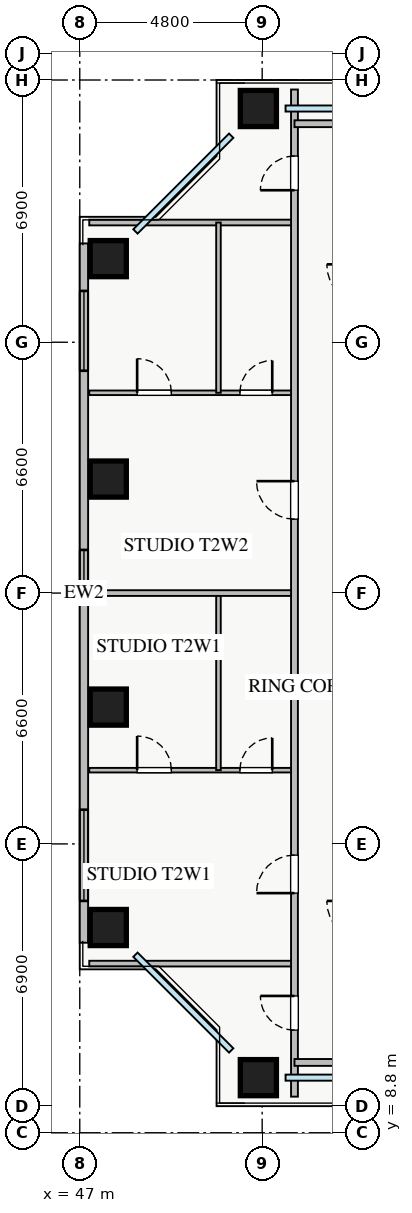
"""IFC4 building model, lengths in metres.
Left out: names, types, materials, properties, quantities, classifications, styles, units other than length and angle.
Written with IfcOpenShell. Run it as: python <this file> out.ifc"""

import sys

from ifc_helpers import new_model, si_unit, direction, frame, frame_2d, origin, origin_2d, place, context, subcontext, project, spatial, rectangle, extrude, source, transform, mapped, element, fill, save


model = new_model("IFC4")
c1 = context("Model", 3, precision=1e-05, world=origin(), true_north=direction((0.0, 1.0)))
c2 = subcontext(c1, "Body", "Model", "MODEL_VIEW")
j1 = project(units=[si_unit("LENGTHUNIT", "METRE"), si_unit("PLANEANGLEUNIT", "RADIAN")], contexts=[c1])
p1 = place(None, origin())
s1 = spatial("IfcSite", under=j1, at=p1, CompositionType="ELEMENT")
p2 = place(p1, origin())
s2 = spatial("IfcBuilding", under=s1, at=p2, CompositionType="ELEMENT")
p3 = place(p2, frame((0.0, 0.0, 60.0)))
s3 = spatial("IfcBuildingStorey", under=s2, at=p3, CompositionType="ELEMENT", Elevation=60.0)
m1 = source(origin(), c2, "Body", "SweptSolid", [
    extrude(rectangle(XDim=0.95, YDim=0.95, at=origin_2d()), origin(), (0.0, 0.0, 1.0), 3.25),
])
for number, where, z_axis, x_axis in (
    (1, (51.7, 10.25, 0.0), (0.0, 0.0, 1.0), (1.0, 0.0, 0.0)),
    (2, (51.7, 35.75, 0.0), (0.0, 0.0, 1.0), (1.0, 0.0, 0.0)),
    (3, (47.75, 14.2, 0.0), (0.0, 0.0, 1.0), (1.0, 0.0, 0.0)),
    (4, (47.75, 20.0, 0.0), (0.0, 0.0, 1.0), (1.0, 0.0, 0.0)),
    (5, (47.75, 26.0, 0.0), (0.0, 0.0, 1.0), (1.0, 0.0, 0.0)),
    (6, (47.75, 31.8, 0.0), (0.0, 0.0, 1.0), (1.0, 0.0, 0.0)),
):
    element("IfcColumn", number, at=place(p3, frame(where, z_axis=z_axis, x_axis=x_axis)), inside=s3, PredefinedType="COLUMN", context=c2, shape_type="MappedRepresentation", body=[
        mapped(m1, transform((0.0, 0.0, 0.0), x_axis=(1.0, 0.0, 0.0), y_axis=(0.0, 1.0, 0.0), z_axis=(0.0, 0.0, 1.0), scale=1.0)),
    ])
p4 = place(p3, frame((47.11, 13.8, 0.0), z_axis=(0.0, 0.0, 1.0), x_axis=(0.0, 1.0, 0.0)))
e7 = element("IfcWall", 7, at=p4, inside=s3, PredefinedType="STANDARD", context=c2, shape_type="SweptSolid", body=[
    extrude(rectangle(XDim=18.4, YDim=0.22, at=frame_2d((9.2, 0.0))), origin(), (0.0, 0.0, 1.0), 2.61),
])
p5 = place(p4, frame((1.1, 0.0, 0.9)))
e8 = element("IfcOpeningElement", 8, at=p5, cuts=e7, PredefinedType="OPENING", context=c2, shape_type="SweptSolid", body=[
    extrude(rectangle(XDim=2.4, YDim=1.48, at=frame_2d((1.2, 0.74))), frame((0.0, 0.12, 0.0), z_axis=(0.0, -1.0, 0.0), x_axis=(1.0, 0.0, 0.0)), (0.0, 0.0, 1.0), 0.24),
])
p6 = place(p4, frame((15.05, 0.0, 0.9)))
e9 = element("IfcOpeningElement", 9, at=p6, cuts=e7, PredefinedType="OPENING", context=c2, shape_type="SweptSolid", body=[
    extrude(rectangle(XDim=2.1, YDim=1.48, at=frame_2d((1.05, 0.74))), frame((0.0, 0.12, 0.0), z_axis=(0.0, -1.0, 0.0), x_axis=(1.0, 0.0, 0.0)), (0.0, 0.0, 1.0), 0.24),
])
p7 = place(p4, frame((9.435, 0.0, 0.9)))
e10 = element("IfcOpeningElement", 10, at=p7, cuts=e7, PredefinedType="OPENING", context=c2, shape_type="SweptSolid", body=[
    extrude(rectangle(XDim=0.9, YDim=1.2, at=frame_2d((0.45, 0.6))), frame((0.0, 0.12, 0.0), z_axis=(0.0, -1.0, 0.0), x_axis=(1.0, 0.0, 0.0)), (0.0, 0.0, 1.0), 0.24),
])
for number, where, z_axis, x_axis in (
    (11, (47.25, 32.75, 0.0), (0.0, 0.0, 1.0), (1.0, 0.0, 0.0)),
    (12, (47.25, 13.25, 0.0), (0.0, 0.0, 1.0), (1.0, 0.0, 0.0)),
):
    element("IfcWall", number, at=place(p3, frame(where, z_axis=z_axis, x_axis=x_axis)), inside=s3, PredefinedType="PARTITIONING", context=c2, shape_type="SweptSolid", body=[
        extrude(rectangle(XDim=5.4, YDim=0.15, at=frame_2d((2.7, 0.0))), origin(), (0.0, 0.0, 1.0), 3.07),
    ])
p8 = place(p3, frame((47.25, 18.34, 0.0), z_axis=(0.0, 0.0, 1.0), x_axis=(1.0, 0.0, 0.0)))
e13 = element("IfcWall", 13, at=p8, inside=s3, PredefinedType="PLUMBINGWALL", context=c2, shape_type="SweptSolid", body=[
    extrude(rectangle(XDim=5.4, YDim=0.12, at=frame_2d((2.7, 0.0))), origin(), (0.0, 0.0, 1.0), 2.765),
])
p9 = place(p8, frame((1.26, 0.0, 0.0)))
e14 = element("IfcOpeningElement", 14, at=p9, cuts=e13, PredefinedType="OPENING", context=c2, shape_type="SweptSolid", body=[
    extrude(rectangle(XDim=0.9, YDim=2.05, at=frame_2d((0.45, 1.025))), frame((0.0, 0.07, 0.0), z_axis=(0.0, -1.0, 0.0), x_axis=(1.0, 0.0, 0.0)), (0.0, 0.0, 1.0), 0.14),
])
p10 = place(p8, frame((3.965, 0.0, 0.0)))
e15 = element("IfcOpeningElement", 15, at=p10, cuts=e13, PredefinedType="OPENING", context=c2, shape_type="SweptSolid", body=[
    extrude(rectangle(XDim=0.85, YDim=2.05, at=frame_2d((0.425, 1.025))), frame((0.0, 0.07, 0.0), z_axis=(0.0, -1.0, 0.0), x_axis=(1.0, 0.0, 0.0)), (0.0, 0.0, 1.0), 0.14),
])
p11 = place(p3, frame((50.65, 18.34, 0.0), z_axis=(0.0, 0.0, 1.0), x_axis=(0.0, 1.0, 0.0)))
e16 = element("IfcWall", 16, at=p11, inside=s3, PredefinedType="PLUMBINGWALL", context=c2, shape_type="SweptSolid", body=[
    extrude(rectangle(XDim=4.66, YDim=0.12, at=frame_2d((2.33, 0.0))), origin(), (0.0, 0.0, 1.0), 3.07),
])
p12 = place(p3, frame((47.25, 28.27, 0.0), z_axis=(0.0, 0.0, 1.0), x_axis=(1.0, 0.0, 0.0)))
e17 = element("IfcWall", 17, at=p12, inside=s3, PredefinedType="PLUMBINGWALL", context=c2, shape_type="SweptSolid", body=[
    extrude(rectangle(XDim=5.4, YDim=0.12, at=frame_2d((2.7, 0.0))), origin(), (0.0, 0.0, 1.0), 3.07),
])
p13 = place(p12, frame((1.26, 0.0, 0.0)))
e18 = element("IfcOpeningElement", 18, at=p13, cuts=e17, PredefinedType="OPENING", context=c2, shape_type="SweptSolid", body=[
    extrude(rectangle(XDim=0.9, YDim=2.05, at=frame_2d((0.45, 1.025))), frame((0.0, 0.07, 0.0), z_axis=(0.0, -1.0, 0.0), x_axis=(1.0, 0.0, 0.0)), (0.0, 0.0, 1.0), 0.14),
])
p14 = place(p12, frame((3.965, 0.0, 0.0)))
e19 = element("IfcOpeningElement", 19, at=p14, cuts=e17, PredefinedType="OPENING", context=c2, shape_type="SweptSolid", body=[
    extrude(rectangle(XDim=0.85, YDim=2.05, at=frame_2d((0.425, 1.025))), frame((0.0, 0.07, 0.0), z_axis=(0.0, -1.0, 0.0), x_axis=(1.0, 0.0, 0.0)), (0.0, 0.0, 1.0), 0.14),
])
p15 = place(p3, frame((50.65, 28.27, 0.0), z_axis=(0.0, 0.0, 1.0), x_axis=(0.0, 1.0, 0.0)))
e20 = element("IfcWall", 20, at=p15, inside=s3, PredefinedType="PLUMBINGWALL", context=c2, shape_type="SweptSolid", body=[
    extrude(rectangle(XDim=4.48, YDim=0.12, at=frame_2d((2.24, 0.0))), origin(), (0.0, 0.0, 1.0), 3.07),
])
p16 = place(p3, frame((47.25, 23.0, 0.0), z_axis=(0.0, 0.0, 1.0), x_axis=(1.0, 0.0, 0.0)))
e21 = element("IfcWall", 21, at=p16, inside=s3, PredefinedType="PARTITIONING", context=c2, shape_type="SweptSolid", body=[
    extrude(rectangle(XDim=5.4, YDim=0.15, at=frame_2d((2.7, 0.0))), origin(), (0.0, 0.0, 1.0), 2.765),
])
p17 = place(p3, frame((52.65, 9.75, 0.0), z_axis=(0.0, 0.0, 1.0), x_axis=(0.0, 1.0, 0.0)))
e22 = element("IfcWall", 22, at=p17, inside=s3, PredefinedType="PARTITIONING", context=c2, shape_type="SweptSolid", body=[
    extrude(rectangle(XDim=26.5, YDim=0.18, at=frame_2d((13.25, 0.0))), origin(), (0.0, 0.0, 1.0), 3.07),
])
p18 = place(p17, frame((23.85, 0.0, 0.0)))
e23 = element("IfcOpeningElement", 23, at=p18, cuts=e22, PredefinedType="OPENING", context=c2, shape_type="SweptSolid", body=[
    extrude(rectangle(XDim=0.9, YDim=2.05, at=frame_2d((0.45, 1.025))), frame((0.0, 0.1, 0.0), z_axis=(0.0, -1.0, 0.0), x_axis=(1.0, 0.0, 0.0)), (0.0, 0.0, 1.0), 0.2),
])
p19 = place(p17, frame((1.75, 0.0, 0.0)))
e24 = element("IfcOpeningElement", 24, at=p19, cuts=e22, PredefinedType="OPENING", context=c2, shape_type="SweptSolid", body=[
    extrude(rectangle(XDim=0.9, YDim=2.05, at=frame_2d((0.45, 1.025))), frame((0.0, 0.1, 0.0), z_axis=(0.0, -1.0, 0.0), x_axis=(1.0, 0.0, 0.0)), (0.0, 0.0, 1.0), 0.2),
])
p20 = place(p17, frame((5.355, 0.0, 0.0)))
e25 = element("IfcOpeningElement", 25, at=p20, cuts=e22, PredefinedType="OPENING", context=c2, shape_type="SweptSolid", body=[
    extrude(rectangle(XDim=1.0, YDim=2.05, at=frame_2d((0.5, 1.025))), frame((0.0, 0.1, 0.0), z_axis=(0.0, -1.0, 0.0), x_axis=(1.0, 0.0, 0.0)), (0.0, 0.0, 1.0), 0.2),
])
p21 = place(p17, frame((15.195, 0.0, 0.0)))
e26 = element("IfcOpeningElement", 26, at=p21, cuts=e22, PredefinedType="OPENING", context=c2, shape_type="SweptSolid", body=[
    extrude(rectangle(XDim=1.0, YDim=2.05, at=frame_2d((0.5, 1.025))), frame((0.0, 0.1, 0.0), z_axis=(0.0, -1.0, 0.0), x_axis=(1.0, 0.0, 0.0)), (0.0, 0.0, 1.0), 0.2),
])
p22 = place(p3, frame((52.65, 35.35, 0.0), z_axis=(0.0, 0.0, 1.0), x_axis=(1.0, 0.0, 0.0)))
e27 = element("IfcWall", 27, at=p22, inside=s3, PredefinedType="PARTITIONING", context=c2, shape_type="SweptSolid", body=[
    extrude(rectangle(XDim=17.0, YDim=0.18, at=frame_2d((8.5, 0.0))), origin(), (0.0, 0.0, 1.0), 3.07),
])
p23 = place(p22, frame((3.825, 0.0, 0.0)))
e28 = element("IfcOpeningElement", 28, at=p23, cuts=e27, PredefinedType="OPENING", context=c2, shape_type="SweptSolid", body=[
    extrude(rectangle(XDim=0.9, YDim=2.05, at=frame_2d((0.45, 1.025))), frame((0.0, 0.1, 0.0), z_axis=(0.0, -1.0, 0.0), x_axis=(1.0, 0.0, 0.0)), (0.0, 0.0, 1.0), 0.2),
])
p24 = place(p22, frame((12.325, 0.0, 0.0)))
e29 = element("IfcOpeningElement", 29, at=p24, cuts=e27, PredefinedType="OPENING", context=c2, shape_type="SweptSolid", body=[
    extrude(rectangle(XDim=0.9, YDim=2.05, at=frame_2d((0.45, 1.025))), frame((0.0, 0.1, 0.0), z_axis=(0.0, -1.0, 0.0), x_axis=(1.0, 0.0, 0.0)), (0.0, 0.0, 1.0), 0.2),
])
p25 = place(p3, frame((52.65, 10.65, 0.0), z_axis=(0.0, 0.0, 1.0), x_axis=(1.0, 0.0, 0.0)))
e30 = element("IfcWall", 30, at=p25, inside=s3, PredefinedType="PARTITIONING", context=c2, shape_type="SweptSolid", body=[
    extrude(rectangle(XDim=17.0, YDim=0.18, at=frame_2d((8.5, 0.0))), origin(), (0.0, 0.0, 1.0), 3.07),
])
p26 = place(p25, frame((4.375, 0.0, 0.0)))
e31 = element("IfcOpeningElement", 31, at=p26, cuts=e30, PredefinedType="OPENING", context=c2, shape_type="SweptSolid", body=[
    extrude(rectangle(XDim=0.9, YDim=2.05, at=frame_2d((0.45, 1.025))), frame((0.0, 0.1, 0.0), z_axis=(0.0, -1.0, 0.0), x_axis=(1.0, 0.0, 0.0)), (0.0, 0.0, 1.0), 0.2),
])
p27 = place(p25, frame((12.875, 0.0, 0.0)))
e32 = element("IfcOpeningElement", 32, at=p27, cuts=e30, PredefinedType="OPENING", context=c2, shape_type="SweptSolid", body=[
    extrude(rectangle(XDim=0.9, YDim=2.05, at=frame_2d((0.45, 1.025))), frame((0.0, 0.1, 0.0), z_axis=(0.0, -1.0, 0.0), x_axis=(1.0, 0.0, 0.0)), (0.0, 0.0, 1.0), 0.2),
])
m2 = source(origin(), c2, "Body", "SweptSolid", [
    extrude(rectangle(XDim=2.4, YDim=1.48, at=frame_2d((1.2, 0.74))), frame((0.0, 0.03, 0.0), z_axis=(0.0, -1.0, 0.0), x_axis=(1.0, 0.0, 0.0)), (0.0, 0.0, 1.0), 0.06),
])
p28 = place(p5, origin())
e33 = element("IfcWindow", 33, at=p28, inside=s3, PartitioningType="TRIPLE_PANEL_VERTICAL", PredefinedType="WINDOW", context=c2, shape_type="MappedRepresentation", body=[
    mapped(m2, transform((0.0, 0.0, 0.0), x_axis=(1.0, 0.0, 0.0), y_axis=(0.0, 1.0, 0.0), z_axis=(0.0, 0.0, 1.0), scale=1.0)),
])
fill(e8, e33)
m3 = source(origin(), c2, "Body", "SweptSolid", [
    extrude(rectangle(XDim=2.1, YDim=1.48, at=frame_2d((1.05, 0.74))), frame((0.0, 0.03, 0.0), z_axis=(0.0, -1.0, 0.0), x_axis=(1.0, 0.0, 0.0)), (0.0, 0.0, 1.0), 0.06),
])
p29 = place(p6, origin())
e34 = element("IfcWindow", 34, at=p29, inside=s3, PartitioningType="TRIPLE_PANEL_VERTICAL", PredefinedType="WINDOW", context=c2, shape_type="MappedRepresentation", body=[
    mapped(m3, transform((0.0, 0.0, 0.0), x_axis=(1.0, 0.0, 0.0), y_axis=(0.0, 1.0, 0.0), z_axis=(0.0, 0.0, 1.0), scale=1.0)),
])
fill(e9, e34)
m4 = source(origin(), c2, "Body", "SweptSolid", [
    extrude(rectangle(XDim=0.9, YDim=2.05, at=frame_2d((0.45, 1.025))), frame((0.0, 0.025, 0.0), z_axis=(0.0, -1.0, 0.0), x_axis=(1.0, 0.0, 0.0)), (0.0, 0.0, 1.0), 0.05),
])
p30 = place(p9, origin())
e35 = element("IfcDoor", 35, at=p30, inside=s3, OperationType="SINGLE_SWING_LEFT", PredefinedType="DOOR", context=c2, shape_type="MappedRepresentation", body=[
    mapped(m4, transform((0.0, 0.0, 0.0), x_axis=(1.0, 0.0, 0.0), y_axis=(0.0, 1.0, 0.0), z_axis=(0.0, 0.0, 1.0), scale=1.0)),
])
fill(e14, e35)
m5 = source(origin(), c2, "Body", "SweptSolid", [
    extrude(rectangle(XDim=0.85, YDim=2.05, at=frame_2d((0.425, 1.025))), frame((0.0, 0.025, 0.0), z_axis=(0.0, -1.0, 0.0), x_axis=(1.0, 0.0, 0.0)), (0.0, 0.0, 1.0), 0.05),
])
p31 = place(p10, origin())
e36 = element("IfcDoor", 36, at=p31, inside=s3, OperationType="SINGLE_SWING_RIGHT", PredefinedType="DOOR", context=c2, shape_type="MappedRepresentation", body=[
    mapped(m5, transform((0.0, 0.0, 0.0), x_axis=(1.0, 0.0, 0.0), y_axis=(0.0, 1.0, 0.0), z_axis=(0.0, 0.0, 1.0), scale=1.0)),
])
fill(e15, e36)
p32 = place(p13, origin())
e37 = element("IfcDoor", 37, at=p32, inside=s3, OperationType="SINGLE_SWING_LEFT", PredefinedType="DOOR", context=c2, shape_type="MappedRepresentation", body=[
    mapped(m4, transform((0.0, 0.0, 0.0), x_axis=(1.0, 0.0, 0.0), y_axis=(0.0, 1.0, 0.0), z_axis=(0.0, 0.0, 1.0), scale=1.0)),
])
fill(e18, e37)
p33 = place(p14, origin())
e38 = element("IfcDoor", 38, at=p33, inside=s3, OperationType="SINGLE_SWING_RIGHT", PredefinedType="DOOR", context=c2, shape_type="MappedRepresentation", body=[
    mapped(m5, transform((0.0, 0.0, 0.0), x_axis=(1.0, 0.0, 0.0), y_axis=(0.0, 1.0, 0.0), z_axis=(0.0, 0.0, 1.0), scale=1.0)),
])
fill(e19, e38)
p34 = place(p18, origin())
e39 = element("IfcDoor", 39, at=p34, inside=s3, OperationType="SINGLE_SWING_LEFT", PredefinedType="DOOR", context=c2, shape_type="MappedRepresentation", body=[
    mapped(m4, transform((0.0, 0.0, 0.0), x_axis=(1.0, 0.0, 0.0), y_axis=(0.0, 1.0, 0.0), z_axis=(0.0, 0.0, 1.0), scale=1.0)),
])
fill(e23, e39)
p35 = place(p19, origin())
e40 = element("IfcDoor", 40, at=p35, inside=s3, OperationType="SINGLE_SWING_RIGHT", PredefinedType="DOOR", context=c2, shape_type="MappedRepresentation", body=[
    mapped(m4, transform((0.0, 0.0, 0.0), x_axis=(1.0, 0.0, 0.0), y_axis=(0.0, 1.0, 0.0), z_axis=(0.0, 0.0, 1.0), scale=1.0)),
])
fill(e24, e40)
m6 = source(origin(), c2, "Body", "SweptSolid", [
    extrude(rectangle(XDim=1.0, YDim=2.05, at=frame_2d((0.5, 1.025))), frame((0.0, 0.025, 0.0), z_axis=(0.0, -1.0, 0.0), x_axis=(1.0, 0.0, 0.0)), (0.0, 0.0, 1.0), 0.05),
])
p36 = place(p20, origin())
e41 = element("IfcDoor", 41, at=p36, inside=s3, OperationType="SINGLE_SWING_LEFT", PredefinedType="DOOR", context=c2, shape_type="MappedRepresentation", body=[
    mapped(m6, transform((0.0, 0.0, 0.0), x_axis=(1.0, 0.0, 0.0), y_axis=(0.0, 1.0, 0.0), z_axis=(0.0, 0.0, 1.0), scale=1.0)),
])
fill(e25, e41)
p37 = place(p21, origin())
e42 = element("IfcDoor", 42, at=p37, inside=s3, OperationType="SINGLE_SWING_RIGHT", PredefinedType="DOOR", context=c2, shape_type="MappedRepresentation", body=[
    mapped(m6, transform((0.0, 0.0, 0.0), x_axis=(1.0, 0.0, 0.0), y_axis=(0.0, 1.0, 0.0), z_axis=(0.0, 0.0, 1.0), scale=1.0)),
])
fill(e26, e42)
m7 = source(origin(), c2, "Body", "SweptSolid", [
    extrude(rectangle(XDim=0.9, YDim=1.2, at=frame_2d((0.45, 0.6))), frame((0.0, 0.03, 0.0), z_axis=(0.0, -1.0, 0.0), x_axis=(1.0, 0.0, 0.0)), (0.0, 0.0, 1.0), 0.06),
])
p38 = place(p7, origin())
e43 = element("IfcWindow", 43, at=p38, inside=s3, PartitioningType="SINGLE_PANEL", PredefinedType="WINDOW", context=c2, shape_type="MappedRepresentation", body=[
    mapped(m7, transform((0.0, 0.0, 0.0), x_axis=(1.0, 0.0, 0.0), y_axis=(0.0, 1.0, 0.0), z_axis=(0.0, 0.0, 1.0), scale=1.0)),
])
fill(e10, e43)
save(model, sys.argv[1])
